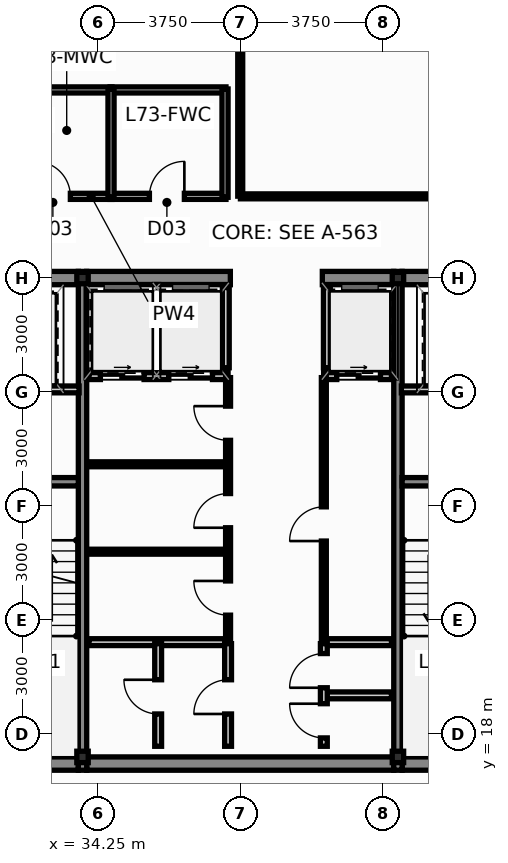
"""IFC4 building model, lengths in metres.
Left out: names, types, materials, properties, quantities, classifications, styles, units other than length and angle.
Written with IfcOpenShell. Run it as: python <this file> out.ifc"""

import sys

from ifc_helpers import new_model, si_unit, direction, frame, frame_2d, origin, origin_2d, place, context, subcontext, project, spatial, rectangle, hollow_rectangle, extrude, source, transform, mapped, element, fill, save


model = new_model("IFC4")
c1 = context("Model", 3, precision=1e-05, world=origin(), true_north=direction((0.0, 1.0)))
c2 = subcontext(c1, "Body", "Model", "MODEL_VIEW")
j1 = project(units=[si_unit("LENGTHUNIT", "METRE"), si_unit("PLANEANGLEUNIT", "RADIAN")], contexts=[c1])
p1 = place(None, origin())
s1 = spatial("IfcSite", under=j1, at=p1, CompositionType="ELEMENT")
p2 = place(p1, origin())
s2 = spatial("IfcBuilding", under=s1, at=p2, CompositionType="ELEMENT")
p3 = place(p2, frame((0.0, 0.0, 277.3)))
s3 = spatial("IfcBuildingStorey", under=s2, at=p3, CompositionType="ELEMENT", Elevation=277.3)
m1 = source(origin(), c2, "Body", "SweptSolid", [
    extrude(hollow_rectangle(XDim=0.3, YDim=0.3, WallThickness=0.012, at=origin_2d()), origin(), (0.0, 0.0, 1.0), 3.65),
])
for number, where, z_axis, x_axis in (
    (1, (33.85, 17.4, 0.0), (0.0, 0.0, 1.0), (1.0, 0.0, 0.0)),
    (2, (42.15, 17.4, 0.0), (0.0, 0.0, 1.0), (1.0, 0.0, 0.0)),
    (3, (33.85, 30.0, 0.0), (0.0, 0.0, 1.0), (1.0, 0.0, 0.0)),
    (4, (42.15, 30.0, 0.0), (0.0, 0.0, 1.0), (1.0, 0.0, 0.0)),
):
    element("IfcColumn", number, at=place(p3, frame(where, z_axis=z_axis, x_axis=x_axis)), inside=s3, PredefinedType="COLUMN", context=c2, shape_type="MappedRepresentation", body=[
        mapped(m1, transform((0.0, 0.0, 0.0), scale=1.0)),
    ])
p4 = place(p3, frame((30.84, 17.225, 0.0), z_axis=(0.0, 0.0, 1.0), x_axis=(1.0, 0.0, 0.0)))
e5 = element("IfcWall", 5, at=p4, inside=s3, PredefinedType="SHEAR", context=c2, shape_type="SweptSolid", body=[
    extrude(rectangle(XDim=2.9, YDim=0.35, at=frame_2d((1.45, 0.0))), origin(), (0.0, 0.0, 1.0), 3.65),
])
p5 = place(p3, frame((33.96, 17.225, 0.0), z_axis=(0.0, 0.0, 1.0), x_axis=(1.0, 0.0, 0.0)))
e6 = element("IfcWall", 6, at=p5, inside=s3, PredefinedType="SHEAR", context=c2, shape_type="SweptSolid", body=[
    extrude(rectangle(XDim=8.08, YDim=0.35, at=frame_2d((4.04, 0.0))), origin(), (0.0, 0.0, 1.0), 3.65),
])
for number, where, z_axis, x_axis in (
    (7, (42.26, 17.225, 0.0), (0.0, 0.0, 1.0), (1.0, 0.0, 0.0)),
    (8, (30.84, 30.0, 0.0), (0.0, 0.0, 1.0), (1.0, 0.0, 0.0)),
):
    element("IfcWall", number, at=place(p3, frame(where, z_axis=z_axis, x_axis=x_axis)), inside=s3, PredefinedType="SHEAR", context=c2, shape_type="SweptSolid", body=[
        extrude(rectangle(XDim=2.9, YDim=0.35, at=frame_2d((1.45, 0.0))), origin(), (0.0, 0.0, 1.0), 3.65),
    ])
p6 = place(p3, frame((33.96, 30.0, 0.0), z_axis=(0.0, 0.0, 1.0), x_axis=(1.0, 0.0, 0.0)))
e9 = element("IfcWall", 9, at=p6, inside=s3, PredefinedType="SHEAR", context=c2, shape_type="SweptSolid", body=[
    extrude(rectangle(XDim=3.78, YDim=0.35, at=frame_2d((1.89, 0.0))), origin(), (0.0, 0.0, 1.0), 3.65),
])
p7 = place(p3, frame((40.16, 30.0, 0.0), z_axis=(0.0, 0.0, 1.0), x_axis=(1.0, 0.0, 0.0)))
e10 = element("IfcWall", 10, at=p7, inside=s3, PredefinedType="SHEAR", context=c2, shape_type="SweptSolid", body=[
    extrude(rectangle(XDim=1.88, YDim=0.35, at=frame_2d((0.94, 0.0))), origin(), (0.0, 0.0, 1.0), 3.65),
])
p8 = place(p3, frame((42.26, 30.0, 0.0), z_axis=(0.0, 0.0, 1.0), x_axis=(1.0, 0.0, 0.0)))
e11 = element("IfcWall", 11, at=p8, inside=s3, PredefinedType="SHEAR", context=c2, shape_type="SweptSolid", body=[
    extrude(rectangle(XDim=2.9, YDim=0.35, at=frame_2d((1.45, 0.0))), origin(), (0.0, 0.0, 1.0), 3.65),
])
for number, where, z_axis, x_axis in (
    (12, (33.85, 17.05, 0.0), (0.0, 0.0, 1.0), (0.0, 1.0, 0.0)),
    (13, (42.15, 17.05, 0.0), (0.0, 0.0, 1.0), (0.0, 1.0, 0.0)),
):
    element("IfcWall", number, at=place(p3, frame(where, z_axis=z_axis, x_axis=x_axis)), inside=s3, PredefinedType="SHEAR", context=c2, shape_type="SweptSolid", body=[
        extrude(rectangle(XDim=13.125, YDim=0.22, at=frame_2d((6.562, 0.0))), origin(), (0.0, 0.0, 1.0), 3.65),
    ])
for number, where, z_axis, x_axis in (
    (14, (30.84, 24.64, 0.0), (0.0, 0.0, 1.0), (1.0, 0.0, 0.0)),
    (15, (42.26, 24.64, 0.0), (0.0, 0.0, 1.0), (1.0, 0.0, 0.0)),
):
    element("IfcWall", number, at=place(p3, frame(where, z_axis=z_axis, x_axis=x_axis)), inside=s3, PredefinedType="SHEAR", context=c2, shape_type="SweptSolid", body=[
        extrude(rectangle(XDim=2.9, YDim=0.22, at=frame_2d((1.45, 0.0))), origin(), (0.0, 0.0, 1.0), 3.65),
    ])
p9 = place(p3, frame((34.02, 27.42, 0.0), z_axis=(0.0, 0.0, 1.0), x_axis=(1.0, 0.0, 0.0)))
e16 = element("IfcWall", 16, at=p9, inside=s3, PredefinedType="PARTITIONING", context=c2, shape_type="SweptSolid", body=[
    extrude(rectangle(XDim=3.66, YDim=0.18, at=frame_2d((1.83, 0.0))), origin(), (0.0, 0.0, 1.0), 3.4),
])
p10 = place(p9, frame((0.3, 0.0, 0.0)))
e17 = element("IfcOpeningElement", 17, at=p10, cuts=e16, PredefinedType="OPENING", context=c2, shape_type="SweptSolid", body=[
    extrude(rectangle(XDim=1.15, YDim=2.2, at=frame_2d((0.575, 1.1))), frame((0.0, 0.102, 0.0), z_axis=(0.0, -1.0, 0.0), x_axis=(1.0, 0.0, 0.0)), (0.0, 0.0, 1.0), 0.204),
])
p11 = place(p9, frame((2.1, 0.0, 0.0)))
e18 = element("IfcOpeningElement", 18, at=p11, cuts=e16, PredefinedType="OPENING", context=c2, shape_type="SweptSolid", body=[
    extrude(rectangle(XDim=1.15, YDim=2.2, at=frame_2d((0.575, 1.1))), frame((0.0, 0.102, 0.0), z_axis=(0.0, -1.0, 0.0), x_axis=(1.0, 0.0, 0.0)), (0.0, 0.0, 1.0), 0.204),
])
p12 = place(p3, frame((40.22, 27.42, 0.0), z_axis=(0.0, 0.0, 1.0), x_axis=(1.0, 0.0, 0.0)))
e19 = element("IfcWall", 19, at=p12, inside=s3, PredefinedType="PARTITIONING", context=c2, shape_type="SweptSolid", body=[
    extrude(rectangle(XDim=1.76, YDim=0.18, at=frame_2d((0.88, 0.0))), origin(), (0.0, 0.0, 1.0), 3.4),
])
p13 = place(p12, frame((0.32, 0.0, 0.0)))
e20 = element("IfcOpeningElement", 20, at=p13, cuts=e19, PredefinedType="OPENING", context=c2, shape_type="SweptSolid", body=[
    extrude(rectangle(XDim=1.15, YDim=2.2, at=frame_2d((0.575, 1.1))), frame((0.0, 0.102, 0.0), z_axis=(0.0, -1.0, 0.0), x_axis=(1.0, 0.0, 0.0)), (0.0, 0.0, 1.0), 0.204),
])
for number, where, z_axis, x_axis in (
    (21, (37.62, 27.64, 0.0), (0.0, 0.0, 1.0), (0.0, 1.0, 0.0)),
    (22, (40.28, 27.64, 0.0), (0.0, 0.0, 1.0), (0.0, 1.0, 0.0)),
):
    element("IfcWall", number, at=place(p3, frame(where, z_axis=z_axis, x_axis=x_axis)), inside=s3, PredefinedType="PARTITIONING", context=c2, shape_type="SweptSolid", body=[
        extrude(rectangle(XDim=2.11, YDim=0.18, at=frame_2d((1.055, 0.0))), origin(), (0.0, 0.0, 1.0), 3.4),
    ])
for number, where, z_axis, x_axis in (
    (23, (30.86, 27.07, 0.0), (0.0, 0.0, 1.0), (1.0, 0.0, 0.0)),
    (24, (42.24, 27.07, 0.0), (0.0, 0.0, 1.0), (1.0, 0.0, 0.0)),
):
    element("IfcWall", number, at=place(p3, frame(where, z_axis=z_axis, x_axis=x_axis)), inside=s3, PredefinedType="PARTITIONING", context=c2, shape_type="SweptSolid", body=[
        extrude(rectangle(XDim=2.9, YDim=0.18, at=frame_2d((1.45, 0.0))), origin(), (0.0, 0.0, 1.0), 3.4),
    ])
p14 = place(p3, frame((34.02, 20.42, 0.0), z_axis=(0.0, 0.0, 1.0), x_axis=(1.0, 0.0, 0.0)))
e25 = element("IfcWall", 25, at=p14, inside=s3, PredefinedType="PARTITIONING", context=c2, shape_type="SweptSolid", body=[
    extrude(rectangle(XDim=3.64, YDim=0.18, at=frame_2d((1.82, 0.0))), origin(), (0.0, 0.0, 1.0), 3.4),
])
p15 = place(p3, frame((40.22, 20.42, 0.0), z_axis=(0.0, 0.0, 1.0), x_axis=(1.0, 0.0, 0.0)))
e26 = element("IfcWall", 26, at=p15, inside=s3, PredefinedType="PARTITIONING", context=c2, shape_type="SweptSolid", body=[
    extrude(rectangle(XDim=1.76, YDim=0.18, at=frame_2d((0.88, 0.0))), origin(), (0.0, 0.0, 1.0), 3.4),
])
for number, where, z_axis, x_axis in (
    (27, (34.02, 22.8, 0.0), (0.0, 0.0, 1.0), (1.0, 0.0, 0.0)),
    (28, (34.02, 25.1, 0.0), (0.0, 0.0, 1.0), (1.0, 0.0, 0.0)),
):
    element("IfcWall", number, at=place(p3, frame(where, z_axis=z_axis, x_axis=x_axis)), inside=s3, PredefinedType="PARTITIONING", context=c2, shape_type="SweptSolid", body=[
        extrude(rectangle(XDim=3.58, YDim=0.13, at=frame_2d((1.79, 0.0))), origin(), (0.0, 0.0, 1.0), 3.4),
    ])
p16 = place(p3, frame((37.68, 20.48, 0.0), z_axis=(0.0, 0.0, 1.0), x_axis=(0.0, 1.0, 0.0)))
e29 = element("IfcWall", 29, at=p16, inside=s3, PredefinedType="PARTITIONING", context=c2, shape_type="SweptSolid", body=[
    extrude(rectangle(XDim=6.9, YDim=0.13, at=frame_2d((3.45, 0.0))), origin(), (0.0, 0.0, 1.0), 3.4),
])
p17 = place(p16, frame((0.65, 0.0, 0.0)))
e30 = element("IfcOpeningElement", 30, at=p17, cuts=e29, PredefinedType="OPENING", context=c2, shape_type="SweptSolid", body=[
    extrude(rectangle(XDim=0.9, YDim=2.1, at=frame_2d((0.45, 1.05))), frame((0.0, 0.077, 0.0), z_axis=(0.0, -1.0, 0.0), x_axis=(1.0, 0.0, 0.0)), (0.0, 0.0, 1.0), 0.154),
])
p18 = place(p16, frame((2.95, 0.0, 0.0)))
e31 = element("IfcOpeningElement", 31, at=p18, cuts=e29, PredefinedType="OPENING", context=c2, shape_type="SweptSolid", body=[
    extrude(rectangle(XDim=0.9, YDim=2.1, at=frame_2d((0.45, 1.05))), frame((0.0, 0.077, 0.0), z_axis=(0.0, -1.0, 0.0), x_axis=(1.0, 0.0, 0.0)), (0.0, 0.0, 1.0), 0.154),
])
p19 = place(p16, frame((5.25, 0.0, 0.0)))
e32 = element("IfcOpeningElement", 32, at=p19, cuts=e29, PredefinedType="OPENING", context=c2, shape_type="SweptSolid", body=[
    extrude(rectangle(XDim=0.9, YDim=2.1, at=frame_2d((0.45, 1.05))), frame((0.0, 0.077, 0.0), z_axis=(0.0, -1.0, 0.0), x_axis=(1.0, 0.0, 0.0)), (0.0, 0.0, 1.0), 0.154),
])
p20 = place(p3, frame((40.2, 20.48, 0.0), z_axis=(0.0, 0.0, 1.0), x_axis=(0.0, 1.0, 0.0)))
e33 = element("IfcWall", 33, at=p20, inside=s3, PredefinedType="PARTITIONING", context=c2, shape_type="SweptSolid", body=[
    extrude(rectangle(XDim=6.9, YDim=0.13, at=frame_2d((3.45, 0.0))), origin(), (0.0, 0.0, 1.0), 3.4),
])
p21 = place(p20, frame((2.6, 0.0, 0.0)))
e34 = element("IfcOpeningElement", 34, at=p21, cuts=e33, PredefinedType="OPENING", context=c2, shape_type="SweptSolid", body=[
    extrude(rectangle(XDim=0.9, YDim=2.1, at=frame_2d((0.45, 1.05))), frame((0.0, 0.077, 0.0), z_axis=(0.0, -1.0, 0.0), x_axis=(1.0, 0.0, 0.0)), (0.0, 0.0, 1.0), 0.154),
])
p22 = place(p3, frame((35.84, 17.68, 0.0), z_axis=(0.0, 0.0, 1.0), x_axis=(0.0, 1.0, 0.0)))
e35 = element("IfcWall", 35, at=p22, inside=s3, PredefinedType="PARTITIONING", context=c2, shape_type="SweptSolid", body=[
    extrude(rectangle(XDim=2.7, YDim=0.18, at=frame_2d((1.35, 0.0))), origin(), (0.0, 0.0, 1.0), 3.4),
])
p23 = place(p22, frame((0.85, 0.0, 0.0)))
e36 = element("IfcOpeningElement", 36, at=p23, cuts=e35, PredefinedType="OPENING", context=c2, shape_type="SweptSolid", body=[
    extrude(rectangle(XDim=0.9, YDim=2.1, at=frame_2d((0.45, 1.05))), frame((0.0, 0.102, 0.0), z_axis=(0.0, -1.0, 0.0), x_axis=(1.0, 0.0, 0.0)), (0.0, 0.0, 1.0), 0.204),
])
p24 = place(p3, frame((37.68, 17.68, 0.0), z_axis=(0.0, 0.0, 1.0), x_axis=(0.0, 1.0, 0.0)))
e37 = element("IfcWall", 37, at=p24, inside=s3, PredefinedType="PARTITIONING", context=c2, shape_type="SweptSolid", body=[
    extrude(rectangle(XDim=2.7, YDim=0.18, at=frame_2d((1.35, 0.0))), origin(), (0.0, 0.0, 1.0), 3.4),
])
p25 = place(p24, frame((0.85, 0.0, 0.0)))
e38 = element("IfcOpeningElement", 38, at=p25, cuts=e37, PredefinedType="OPENING", context=c2, shape_type="SweptSolid", body=[
    extrude(rectangle(XDim=0.9, YDim=2.1, at=frame_2d((0.45, 1.05))), frame((0.0, 0.102, 0.0), z_axis=(0.0, -1.0, 0.0), x_axis=(1.0, 0.0, 0.0)), (0.0, 0.0, 1.0), 0.204),
])
p26 = place(p3, frame((40.28, 19.02, 0.0), z_axis=(0.0, 0.0, 1.0), x_axis=(1.0, 0.0, 0.0)))
e39 = element("IfcWall", 39, at=p26, inside=s3, PredefinedType="PARTITIONING", context=c2, shape_type="SweptSolid", body=[
    extrude(rectangle(XDim=1.7, YDim=0.18, at=frame_2d((0.85, 0.0))), origin(), (0.0, 0.0, 1.0), 3.4),
])
p27 = place(p3, frame((40.2, 17.68, 0.0), z_axis=(0.0, 0.0, 1.0), x_axis=(0.0, 1.0, 0.0)))
e40 = element("IfcWall", 40, at=p27, inside=s3, PredefinedType="PARTITIONING", context=c2, shape_type="SweptSolid", body=[
    extrude(rectangle(XDim=2.7, YDim=0.18, at=frame_2d((1.35, 0.0))), origin(), (0.0, 0.0, 1.0), 3.4),
])
p28 = place(p27, frame((0.22, 0.0, 0.0)))
e41 = element("IfcOpeningElement", 41, at=p28, cuts=e40, PredefinedType="OPENING", context=c2, shape_type="SweptSolid", body=[
    extrude(rectangle(XDim=0.9, YDim=2.1, at=frame_2d((0.45, 1.05))), frame((0.0, 0.102, 0.0), z_axis=(0.0, -1.0, 0.0), x_axis=(1.0, 0.0, 0.0)), (0.0, 0.0, 1.0), 0.204),
])
p29 = place(p27, frame((1.54, 0.0, 0.0)))
e42 = element("IfcOpeningElement", 42, at=p29, cuts=e40, PredefinedType="OPENING", context=c2, shape_type="SweptSolid", body=[
    extrude(rectangle(XDim=0.9, YDim=2.1, at=frame_2d((0.45, 1.05))), frame((0.0, 0.102, 0.0), z_axis=(0.0, -1.0, 0.0), x_axis=(1.0, 0.0, 0.0)), (0.0, 0.0, 1.0), 0.204),
])
p30 = place(p3, frame((31.575, 32.15, 0.0), z_axis=(0.0, 0.0, 1.0), x_axis=(1.0, 0.0, 0.0)))
e43 = element("IfcWall", 43, at=p30, inside=s3, PredefinedType="PLUMBINGWALL", context=c2, shape_type="SweptSolid", body=[
    extrude(rectangle(XDim=3.05, YDim=0.16, at=frame_2d((1.525, 0.0))), origin(), (0.0, 0.0, 1.0), 3.085),
])
p31 = place(p30, frame((1.035, 0.0, 0.0)))
e44 = element("IfcOpeningElement", 44, at=p31, cuts=e43, PredefinedType="OPENING", context=c2, shape_type="SweptSolid", body=[
    extrude(rectangle(XDim=0.92, YDim=2.1, at=frame_2d((0.46, 1.05))), frame((0.0, 0.092, 0.0), z_axis=(0.0, -1.0, 0.0), x_axis=(1.0, 0.0, 0.0)), (0.0, 0.0, 1.0), 0.184),
])
p32 = place(p3, frame((34.575, 32.15, 0.0), z_axis=(0.0, 0.0, 1.0), x_axis=(1.0, 0.0, 0.0)))
e45 = element("IfcWall", 45, at=p32, inside=s3, PredefinedType="PLUMBINGWALL", context=c2, shape_type="SweptSolid", body=[
    extrude(rectangle(XDim=3.05, YDim=0.16, at=frame_2d((1.525, 0.0))), origin(), (0.0, 0.0, 1.0), 3.085),
])
p33 = place(p32, frame((1.035, 0.0, 0.0)))
e46 = element("IfcOpeningElement", 46, at=p33, cuts=e45, PredefinedType="OPENING", context=c2, shape_type="SweptSolid", body=[
    extrude(rectangle(XDim=0.92, YDim=2.1, at=frame_2d((0.46, 1.05))), frame((0.0, 0.092, 0.0), z_axis=(0.0, -1.0, 0.0), x_axis=(1.0, 0.0, 0.0)), (0.0, 0.0, 1.0), 0.184),
])
for number, where, z_axis, x_axis in (
    (47, (31.575, 34.95, 0.0), (0.0, 0.0, 1.0), (1.0, 0.0, 0.0)),
    (48, (37.625, 34.95, 0.0), (0.0, 0.0, 1.0), (-1.0, 0.0, 0.0)),
):
    element("IfcWall", number, at=place(p3, frame(where, z_axis=z_axis, x_axis=x_axis)), inside=s3, PredefinedType="PLUMBINGWALL", context=c2, shape_type="SweptSolid", body=[
        extrude(rectangle(XDim=3.05, YDim=0.16, at=frame_2d((1.525, 0.0))), origin(), (0.0, 0.0, 1.0), 3.085),
    ])
for number, where, z_axis, x_axis in (
    (49, (34.6, 32.125, 0.0), (0.0, 0.0, 1.0), (0.0, 1.0, 0.0)),
    (50, (37.6, 32.125, 0.0), (0.0, 0.0, 1.0), (0.0, 1.0, 0.0)),
):
    element("IfcWall", number, at=place(p3, frame(where, z_axis=z_axis, x_axis=x_axis)), inside=s3, PredefinedType="PLUMBINGWALL", context=c2, shape_type="SweptSolid", body=[
        extrude(rectangle(XDim=2.85, YDim=0.16, at=frame_2d((1.425, 0.0))), origin(), (0.0, 0.0, 1.0), 3.4),
    ])
p34 = place(p3, frame((38.0, 32.155, 0.0), z_axis=(0.0, 0.0, 1.0), x_axis=(0.0, 1.0, 0.0)))
e51 = element("IfcWall", 51, at=p34, inside=s3, PredefinedType="PARTITIONING", context=c2, shape_type="SweptSolid", body=[
    extrude(rectangle(XDim=19.87, YDim=0.13, at=frame_2d((9.935, 0.0))), origin(), (0.0, 0.0, 1.0), 3.4),
])
p35 = place(p3, frame((50.685, 32.15, 0.0), z_axis=(0.0, 0.0, 1.0), x_axis=(-1.0, 0.0, 0.0)))
e52 = element("IfcWall", 52, at=p35, inside=s3, PredefinedType="PARTITIONING", context=c2, shape_type="SweptSolid", body=[
    extrude(rectangle(XDim=12.68, YDim=0.13, at=frame_2d((6.34, 0.0))), origin(), (0.0, 0.0, 1.0), 3.085),
])
p36 = place(p35, frame((5.817, 0.0, 0.0)))
e53 = element("IfcOpeningElement", 53, at=p36, cuts=e52, PredefinedType="OPENING", context=c2, shape_type="SweptSolid", body=[
    extrude(rectangle(XDim=0.96, YDim=2.15, at=frame_2d((0.48, 1.075))), frame((0.0, 0.077, 0.0), z_axis=(0.0, -1.0, 0.0), x_axis=(1.0, 0.0, 0.0)), (0.0, 0.0, 1.0), 0.154),
])
p37 = place(p10, origin())
e54 = element("IfcDoor", 54, at=p37, inside=s3, OperationType="SLIDING_TO_RIGHT", PredefinedType="DOOR", context=c2, shape_type="SweptSolid", body=[
    extrude(rectangle(XDim=1.15, YDim=2.2, at=frame_2d((0.575, 1.1))), frame((0.0, 0.025, 0.0), z_axis=(0.0, -1.0, 0.0), x_axis=(1.0, 0.0, 0.0)), (0.0, 0.0, 1.0), 0.05),
])
fill(e17, e54)
p38 = place(p11, origin())
e55 = element("IfcDoor", 55, at=p38, inside=s3, OperationType="SLIDING_TO_LEFT", PredefinedType="DOOR", context=c2, shape_type="SweptSolid", body=[
    extrude(rectangle(XDim=1.15, YDim=2.2, at=frame_2d((0.575, 1.1))), frame((0.0, 0.025, 0.0), z_axis=(0.0, -1.0, 0.0), x_axis=(1.0, 0.0, 0.0)), (0.0, 0.0, 1.0), 0.05),
])
fill(e18, e55)
p39 = place(p13, origin())
e56 = element("IfcDoor", 56, at=p39, inside=s3, OperationType="SLIDING_TO_RIGHT", PredefinedType="DOOR", context=c2, shape_type="SweptSolid", body=[
    extrude(rectangle(XDim=1.15, YDim=2.2, at=frame_2d((0.575, 1.1))), frame((0.0, 0.025, 0.0), z_axis=(0.0, -1.0, 0.0), x_axis=(1.0, 0.0, 0.0)), (0.0, 0.0, 1.0), 0.05),
])
fill(e20, e56)
p40 = place(p17, origin())
e57 = element("IfcDoor", 57, at=p40, inside=s3, OperationType="SINGLE_SWING_RIGHT", PredefinedType="DOOR", context=c2, shape_type="SweptSolid", body=[
    extrude(rectangle(XDim=0.9, YDim=2.1, at=frame_2d((0.45, 1.05))), frame((0.0, 0.025, 0.0), z_axis=(0.0, -1.0, 0.0), x_axis=(1.0, 0.0, 0.0)), (0.0, 0.0, 1.0), 0.05),
])
fill(e30, e57)
p41 = place(p18, origin())
e58 = element("IfcDoor", 58, at=p41, inside=s3, OperationType="SINGLE_SWING_LEFT", PredefinedType="DOOR", context=c2, shape_type="SweptSolid", body=[
    extrude(rectangle(XDim=0.9, YDim=2.1, at=frame_2d((0.45, 1.05))), frame((0.0, 0.025, 0.0), z_axis=(0.0, -1.0, 0.0), x_axis=(1.0, 0.0, 0.0)), (0.0, 0.0, 1.0), 0.05),
])
fill(e31, e58)
p42 = place(p19, origin())
e59 = element("IfcDoor", 59, at=p42, inside=s3, OperationType="SINGLE_SWING_RIGHT", PredefinedType="DOOR", context=c2, shape_type="SweptSolid", body=[
    extrude(rectangle(XDim=0.9, YDim=2.1, at=frame_2d((0.45, 1.05))), frame((0.0, 0.025, 0.0), z_axis=(0.0, -1.0, 0.0), x_axis=(1.0, 0.0, 0.0)), (0.0, 0.0, 1.0), 0.05),
])
fill(e32, e59)
p43 = place(p21, origin())
e60 = element("IfcDoor", 60, at=p43, inside=s3, OperationType="SINGLE_SWING_LEFT", PredefinedType="DOOR", context=c2, shape_type="SweptSolid", body=[
    extrude(rectangle(XDim=0.9, YDim=2.1, at=frame_2d((0.45, 1.05))), frame((0.0, 0.025, 0.0), z_axis=(0.0, -1.0, 0.0), x_axis=(1.0, 0.0, 0.0)), (0.0, 0.0, 1.0), 0.05),
])
fill(e34, e60)
p44 = place(p23, origin())
e61 = element("IfcDoor", 61, at=p44, inside=s3, OperationType="SINGLE_SWING_RIGHT", PredefinedType="DOOR", context=c2, shape_type="SweptSolid", body=[
    extrude(rectangle(XDim=0.9, YDim=2.1, at=frame_2d((0.45, 1.05))), frame((0.0, 0.025, 0.0), z_axis=(0.0, -1.0, 0.0), x_axis=(1.0, 0.0, 0.0)), (0.0, 0.0, 1.0), 0.05),
])
fill(e36, e61)
p45 = place(p25, origin())
e62 = element("IfcDoor", 62, at=p45, inside=s3, OperationType="SINGLE_SWING_LEFT", PredefinedType="DOOR", context=c2, shape_type="SweptSolid", body=[
    extrude(rectangle(XDim=0.9, YDim=2.1, at=frame_2d((0.45, 1.05))), frame((0.0, 0.025, 0.0), z_axis=(0.0, -1.0, 0.0), x_axis=(1.0, 0.0, 0.0)), (0.0, 0.0, 1.0), 0.05),
])
fill(e38, e62)
p46 = place(p28, origin())
e63 = element("IfcDoor", 63, at=p46, inside=s3, OperationType="SINGLE_SWING_RIGHT", PredefinedType="DOOR", context=c2, shape_type="SweptSolid", body=[
    extrude(rectangle(XDim=0.9, YDim=2.1, at=frame_2d((0.45, 1.05))), frame((0.0, 0.025, 0.0), z_axis=(0.0, -1.0, 0.0), x_axis=(1.0, 0.0, 0.0)), (0.0, 0.0, 1.0), 0.05),
])
fill(e41, e63)
p47 = place(p29, origin())
e64 = element("IfcDoor", 64, at=p47, inside=s3, OperationType="SINGLE_SWING_LEFT", PredefinedType="DOOR", context=c2, shape_type="SweptSolid", body=[
    extrude(rectangle(XDim=0.9, YDim=2.1, at=frame_2d((0.45, 1.05))), frame((0.0, 0.025, 0.0), z_axis=(0.0, -1.0, 0.0), x_axis=(1.0, 0.0, 0.0)), (0.0, 0.0, 1.0), 0.05),
])
fill(e42, e64)
p48 = place(p31, origin())
e65 = element("IfcDoor", 65, at=p48, inside=s3, OperationType="SINGLE_SWING_LEFT", PredefinedType="DOOR", context=c2, shape_type="SweptSolid", body=[
    extrude(rectangle(XDim=0.92, YDim=2.1, at=frame_2d((0.46, 1.05))), frame((0.0, 0.025, 0.0), z_axis=(0.0, -1.0, 0.0), x_axis=(1.0, 0.0, 0.0)), (0.0, 0.0, 1.0), 0.05),
])
fill(e44, e65)
p49 = place(p33, origin())
e66 = element("IfcDoor", 66, at=p49, inside=s3, OperationType="SINGLE_SWING_RIGHT", PredefinedType="DOOR", context=c2, shape_type="SweptSolid", body=[
    extrude(rectangle(XDim=0.92, YDim=2.1, at=frame_2d((0.46, 1.05))), frame((0.0, 0.025, 0.0), z_axis=(0.0, -1.0, 0.0), x_axis=(1.0, 0.0, 0.0)), (0.0, 0.0, 1.0), 0.05),
])
fill(e46, e66)
save(model, sys.argv[1])
